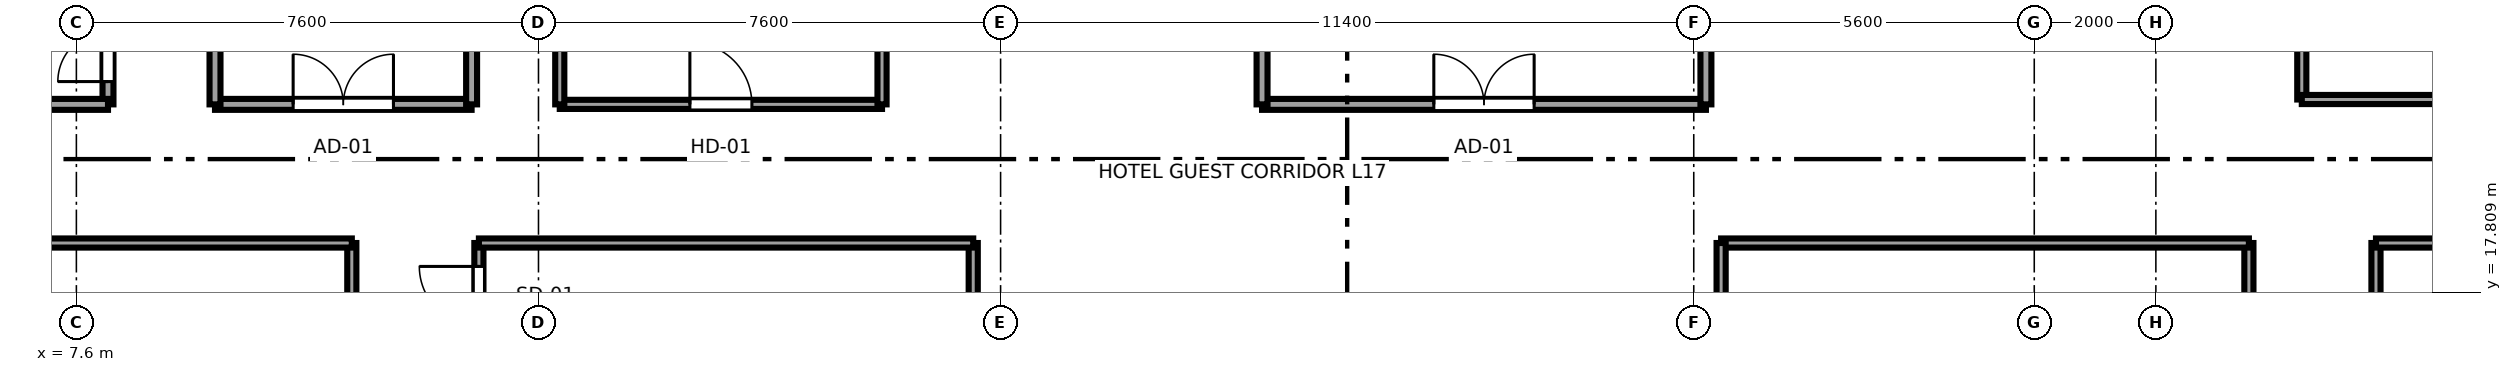
"""IFC4 building model, lengths in metres.
Left out: names, types, materials, properties, quantities, classifications, styles, units other than length and angle.
Written with IfcOpenShell. Run it as: python <this file> out.ifc"""

import sys

from ifc_helpers import new_model, si_unit, direction, frame, frame_2d, origin, place, context, subcontext, project, spatial, rectangle, extrude, source, transform, mapped, element, fill, save


model = new_model("IFC4")
c1 = context("Model", 3, precision=1e-05, world=origin(), true_north=direction((0.0, 1.0)))
c2 = subcontext(c1, "Body", "Model", "MODEL_VIEW")
j1 = project(units=[si_unit("LENGTHUNIT", "METRE"), si_unit("PLANEANGLEUNIT", "RADIAN")], contexts=[c1])
p1 = place(None, origin())
s1 = spatial("IfcSite", under=j1, at=p1, CompositionType="ELEMENT")
p2 = place(p1, origin())
s2 = spatial("IfcBuilding", under=s1, at=p2, CompositionType="ELEMENT")
p3 = place(p2, frame((0.0, 0.0, 71.05)))
s3 = spatial("IfcBuildingStorey", under=s2, at=p3, CompositionType="ELEMENT", Elevation=71.05)
p4 = place(p3, frame((12.13, 11.81, 0.0), z_axis=(0.0, 0.0, 1.0), x_axis=(0.0, 1.0, 0.0)))
e1 = element("IfcWall", 1, at=p4, inside=s3, PredefinedType="PARTITIONING", context=c2, shape_type="SweptSolid", body=[
    extrude(rectangle(XDim=6.81, YDim=0.15, at=frame_2d((3.405, 0.0))), origin(), (0.0, 0.0, 1.0), 3.37),
])
p5 = place(p4, frame((2.895, 0.0, 0.0)))
e2 = element("IfcOpeningElement", 2, at=p5, cuts=e1, PredefinedType="OPENING", context=c2, shape_type="SweptSolid", body=[
    extrude(rectangle(XDim=0.98, YDim=2.12, at=frame_2d((0.49, 1.06))), frame((0.0, 0.085, 0.0), z_axis=(0.0, -1.0, 0.0), x_axis=(1.0, 0.0, 0.0)), (0.0, 0.0, 1.0), 0.17),
])
p6 = place(p3, frame((0.405, 18.62, 0.0), z_axis=(0.0, 0.0, 1.0), x_axis=(1.0, 0.0, 0.0)))
e3 = element("IfcWall", 3, at=p6, inside=s3, PredefinedType="PARTITIONING", context=c2, shape_type="SweptSolid", body=[
    extrude(rectangle(XDim=11.725, YDim=0.15, at=frame_2d((5.862, 0.0))), origin(), (0.0, 0.0, 1.0), 3.37),
])
p7 = place(p3, frame((14.22, 15.01, 0.0), z_axis=(0.0, 0.0, 1.0), x_axis=(0.0, 1.0, 0.0)))
e4 = element("IfcWall", 4, at=p7, inside=s3, PredefinedType="PARTITIONING", context=c2, shape_type="SweptSolid", body=[
    extrude(rectangle(XDim=3.61, YDim=0.15, at=frame_2d((1.805, 0.0))), origin(), (0.0, 0.0, 1.0), 3.37),
])
p8 = place(p7, frame((2.245, 0.0, 0.0)))
e5 = element("IfcOpeningElement", 5, at=p8, cuts=e4, PredefinedType="OPENING", context=c2, shape_type="SweptSolid", body=[
    extrude(rectangle(XDim=0.98, YDim=2.12, at=frame_2d((0.49, 1.06))), frame((0.0, 0.085, 0.0), z_axis=(0.0, -1.0, 0.0), x_axis=(1.0, 0.0, 0.0)), (0.0, 0.0, 1.0), 0.17),
])
p9 = place(p3, frame((22.35, 12.68, 0.0), z_axis=(0.0, 0.0, 1.0), x_axis=(0.0, 1.0, 0.0)))
e6 = element("IfcWall", 6, at=p9, inside=s3, PredefinedType="PARTITIONING", context=c2, shape_type="SweptSolid", body=[
    extrude(rectangle(XDim=5.94, YDim=0.15, at=frame_2d((2.97, 0.0))), origin(), (0.0, 0.0, 1.0), 3.37),
])
p10 = place(p3, frame((14.22, 18.62, 0.0), z_axis=(0.0, 0.0, 1.0), x_axis=(1.0, 0.0, 0.0)))
e7 = element("IfcWall", 7, at=p10, inside=s3, PredefinedType="PARTITIONING", context=c2, shape_type="SweptSolid", body=[
    extrude(rectangle(XDim=8.13, YDim=0.15, at=frame_2d((4.065, 0.0))), origin(), (0.0, 0.0, 1.0), 3.37),
])
p11 = place(p3, frame((43.33, 11.61, 0.0), z_axis=(0.0, 0.0, 1.0), x_axis=(0.0, 1.0, 0.0)))
e8 = element("IfcWall", 8, at=p11, inside=s3, PredefinedType="PARTITIONING", context=c2, shape_type="SweptSolid", body=[
    extrude(rectangle(XDim=7.01, YDim=0.15, at=frame_2d((3.505, 0.0))), origin(), (0.0, 0.0, 1.0), 3.37),
])
p12 = place(p11, frame((2.995, 0.0, 0.0)))
e9 = element("IfcOpeningElement", 9, at=p12, cuts=e8, PredefinedType="OPENING", context=c2, shape_type="SweptSolid", body=[
    extrude(rectangle(XDim=0.98, YDim=2.12, at=frame_2d((0.49, 1.06))), frame((0.0, 0.085, 0.0), z_axis=(0.0, -1.0, 0.0), x_axis=(1.0, 0.0, 0.0)), (0.0, 0.0, 1.0), 0.17),
])
p13 = place(p3, frame((34.65, 18.62, 0.0), z_axis=(0.0, 0.0, 1.0), x_axis=(1.0, 0.0, 0.0)))
e10 = element("IfcWall", 10, at=p13, inside=s3, PredefinedType="PARTITIONING", context=c2, shape_type="SweptSolid", body=[
    extrude(rectangle(XDim=8.68, YDim=0.15, at=frame_2d((4.34, 0.0))), origin(), (0.0, 0.0, 1.0), 3.37),
])
p14 = place(p3, frame((34.65, 9.28, 0.0), z_axis=(0.0, 0.0, 1.0), x_axis=(0.0, 1.0, 0.0)))
e11 = element("IfcWall", 11, at=p14, inside=s3, PredefinedType="PARTITIONING", context=c2, shape_type="SweptSolid", body=[
    extrude(rectangle(XDim=9.34, YDim=0.15, at=frame_2d((4.67, 0.0))), origin(), (0.0, 0.0, 1.0), 3.37),
])
p15 = place(p3, frame((45.42, 15.81, 0.0), z_axis=(0.0, 0.0, 1.0), x_axis=(0.0, 1.0, 0.0)))
e12 = element("IfcWall", 12, at=p15, inside=s3, PredefinedType="PARTITIONING", context=c2, shape_type="SweptSolid", body=[
    extrude(rectangle(XDim=2.81, YDim=0.15, at=frame_2d((1.405, 0.0))), origin(), (0.0, 0.0, 1.0), 3.37),
])
p16 = place(p15, frame((0.895, 0.0, 0.0)))
e13 = element("IfcOpeningElement", 13, at=p16, cuts=e12, PredefinedType="OPENING", context=c2, shape_type="SweptSolid", body=[
    extrude(rectangle(XDim=0.98, YDim=2.12, at=frame_2d((0.49, 1.06))), frame((0.0, 0.085, 0.0), z_axis=(0.0, -1.0, 0.0), x_axis=(1.0, 0.0, 0.0)), (0.0, 0.0, 1.0), 0.17),
])
p17 = place(p3, frame((45.42, 18.62, 0.0), z_axis=(0.0, 0.0, 1.0), x_axis=(1.0, 0.0, 0.0)))
e14 = element("IfcWall", 14, at=p17, inside=s3, PredefinedType="PARTITIONING", context=c2, shape_type="SweptSolid", body=[
    extrude(rectangle(XDim=11.175, YDim=0.15, at=frame_2d((5.587, 0.0))), origin(), (0.0, 0.0, 1.0), 3.37),
])
p18 = place(p3, frame((8.12, 20.9, 0.0), z_axis=(0.0, 0.0, 1.0), x_axis=(0.0, 1.0, 0.0)))
e15 = element("IfcWall", 15, at=p18, inside=s3, PredefinedType="PARTITIONING", context=c2, shape_type="SweptSolid", body=[
    extrude(rectangle(XDim=5.2, YDim=0.18, at=frame_2d((2.6, 0.0))), origin(), (0.0, 0.0, 1.0), 3.37),
])
p19 = place(p18, frame((0.375, 0.0, 0.0)))
e16 = element("IfcOpeningElement", 16, at=p19, cuts=e15, PredefinedType="OPENING", context=c2, shape_type="SweptSolid", body=[
    extrude(rectangle(XDim=1.65, YDim=2.15, at=frame_2d((0.825, 1.075))), frame((0.0, 0.1, 0.0), z_axis=(0.0, -1.0, 0.0), x_axis=(1.0, 0.0, 0.0)), (0.0, 0.0, 1.0), 0.2),
])
p20 = place(p3, frame((0.405, 20.9, 0.0), z_axis=(0.0, 0.0, 1.0), x_axis=(1.0, 0.0, 0.0)))
e17 = element("IfcWall", 17, at=p20, inside=s3, PredefinedType="PARTITIONING", context=c2, shape_type="SweptSolid", body=[
    extrude(rectangle(XDim=7.715, YDim=0.18, at=frame_2d((3.857, 0.0))), origin(), (0.0, 0.0, 1.0), 3.37),
])
p21 = place(p3, frame((44.2, 20.98, 0.0), z_axis=(0.0, 0.0, 1.0), x_axis=(0.0, 1.0, 0.0)))
e18 = element("IfcWall", 18, at=p21, inside=s3, PredefinedType="PARTITIONING", context=c2, shape_type="SweptSolid", body=[
    extrude(rectangle(XDim=5.69, YDim=0.15, at=frame_2d((2.845, 0.0))), origin(), (0.0, 0.0, 1.0), 3.37),
])
p22 = place(p21, frame((2.355, 0.0, 0.0)))
e19 = element("IfcOpeningElement", 19, at=p22, cuts=e18, PredefinedType="OPENING", context=c2, shape_type="SweptSolid", body=[
    extrude(rectangle(XDim=0.98, YDim=2.12, at=frame_2d((0.49, 1.06))), frame((0.0, 0.085, 0.0), z_axis=(0.0, -1.0, 0.0), x_axis=(1.0, 0.0, 0.0)), (0.0, 0.0, 1.0), 0.17),
])
p23 = place(p3, frame((44.2, 20.98, 0.0), z_axis=(0.0, 0.0, 1.0), x_axis=(1.0, 0.0, 0.0)))
e20 = element("IfcWall", 20, at=p23, inside=s3, PredefinedType="PARTITIONING", context=c2, shape_type="SweptSolid", body=[
    extrude(rectangle(XDim=12.395, YDim=0.15, at=frame_2d((6.198, 0.0))), origin(), (0.0, 0.0, 1.0), 3.37),
])
p24 = place(p3, frame((9.88, 20.9, 0.0), z_axis=(0.0, 0.0, 1.0), x_axis=(1.0, 0.0, 0.0)))
e21 = element("IfcWall", 21, at=p24, inside=s3, PredefinedType="PARTITIONING", context=c2, shape_type="SweptSolid", body=[
    extrude(rectangle(XDim=4.22, YDim=0.18, at=frame_2d((2.11, 0.0))), origin(), (0.0, 0.0, 1.0), 3.37),
])
p25 = place(p24, frame((1.285, 0.0, 0.0)))
e22 = element("IfcOpeningElement", 22, at=p25, cuts=e21, PredefinedType="OPENING", context=c2, shape_type="SweptSolid", body=[
    extrude(rectangle(XDim=1.65, YDim=2.15, at=frame_2d((0.825, 1.075))), frame((0.0, 0.1, 0.0), z_axis=(0.0, -1.0, 0.0), x_axis=(1.0, 0.0, 0.0)), (0.0, 0.0, 1.0), 0.2),
])
for number, where, z_axis, x_axis in (
    (23, (9.88, 20.9, 0.0), (0.0, 0.0, 1.0), (0.0, 1.0, 0.0)),
    (24, (14.1, 20.9, 0.0), (0.0, 0.0, 1.0), (0.0, 1.0, 0.0)),
):
    element("IfcWall", number, at=place(p3, frame(where, z_axis=z_axis, x_axis=x_axis)), inside=s3, PredefinedType="PARTITIONING", context=c2, shape_type="SweptSolid", body=[
        extrude(rectangle(XDim=8.85, YDim=0.18, at=frame_2d((4.425, 0.0))), origin(), (0.0, 0.0, 1.0), 3.37),
    ])
p26 = place(p3, frame((27.1, 20.9, 0.0), z_axis=(0.0, 0.0, 1.0), x_axis=(1.0, 0.0, 0.0)))
e25 = element("IfcWall", 25, at=p26, inside=s3, PredefinedType="PARTITIONING", context=c2, shape_type="SweptSolid", body=[
    extrude(rectangle(XDim=7.3, YDim=0.18, at=frame_2d((3.65, 0.0))), origin(), (0.0, 0.0, 1.0), 3.37),
])
p27 = place(p26, frame((2.825, 0.0, 0.0)))
e26 = element("IfcOpeningElement", 26, at=p27, cuts=e25, PredefinedType="OPENING", context=c2, shape_type="SweptSolid", body=[
    extrude(rectangle(XDim=1.65, YDim=2.15, at=frame_2d((0.825, 1.075))), frame((0.0, 0.1, 0.0), z_axis=(0.0, -1.0, 0.0), x_axis=(1.0, 0.0, 0.0)), (0.0, 0.0, 1.0), 0.2),
])
for number, where, z_axis, x_axis in (
    (27, (27.1, 20.9, 0.0), (0.0, 0.0, 1.0), (0.0, 1.0, 0.0)),
    (28, (34.4, 20.9, 0.0), (0.0, 0.0, 1.0), (0.0, 1.0, 0.0)),
):
    element("IfcWall", number, at=place(p3, frame(where, z_axis=z_axis, x_axis=x_axis)), inside=s3, PredefinedType="PARTITIONING", context=c2, shape_type="SweptSolid", body=[
        extrude(rectangle(XDim=8.9, YDim=0.18, at=frame_2d((4.45, 0.0))), origin(), (0.0, 0.0, 1.0), 3.37),
    ])
p28 = place(p3, frame((15.55, 20.9, 0.0), z_axis=(0.0, 0.0, 1.0), x_axis=(1.0, 0.0, 0.0)))
e29 = element("IfcWall", 29, at=p28, inside=s3, PredefinedType="PARTITIONING", context=c2, shape_type="SweptSolid", body=[
    extrude(rectangle(XDim=5.3, YDim=0.15, at=frame_2d((2.65, 0.0))), origin(), (0.0, 0.0, 1.0), 3.37),
])
p29 = place(p28, frame((2.14, 0.0, 0.0)))
e30 = element("IfcOpeningElement", 30, at=p29, cuts=e29, PredefinedType="OPENING", context=c2, shape_type="SweptSolid", body=[
    extrude(rectangle(XDim=1.02, YDim=2.03, at=frame_2d((0.51, 1.015))), frame((0.0, 0.085, 0.0), z_axis=(0.0, -1.0, 0.0), x_axis=(1.0, 0.0, 0.0)), (0.0, 0.0, 1.0), 0.17),
])
for number, where, z_axis, x_axis in (
    (31, (15.55, 20.9, 0.0), (0.0, 0.0, 1.0), (0.0, 1.0, 0.0)),
    (32, (20.85, 20.9, 0.0), (0.0, 0.0, 1.0), (0.0, 1.0, 0.0)),
):
    element("IfcWall", number, at=place(p3, frame(where, z_axis=z_axis, x_axis=x_axis)), inside=s3, PredefinedType="PARTITIONING", context=c2, shape_type="SweptSolid", body=[
        extrude(rectangle(XDim=8.9, YDim=0.15, at=frame_2d((4.45, 0.0))), origin(), (0.0, 0.0, 1.0), 3.37),
    ])
m1 = source(origin(), c2, "Body", "SweptSolid", [
    extrude(rectangle(XDim=0.98, YDim=2.12, at=frame_2d((0.49, 1.06))), frame((0.0, 0.025, 0.0), z_axis=(0.0, -1.0, 0.0), x_axis=(1.0, 0.0, 0.0)), (0.0, 0.0, 1.0), 0.05),
])
p30 = place(p8, origin())
e33 = element("IfcDoor", 33, at=p30, inside=s3, OperationType="SINGLE_SWING_RIGHT", PredefinedType="DOOR", context=c2, shape_type="MappedRepresentation", body=[
    mapped(m1, transform((0.0, 0.0, 0.0), x_axis=(1.0, 0.0, 0.0), y_axis=(0.0, 1.0, 0.0), z_axis=(0.0, 0.0, 1.0), scale=1.0)),
])
fill(e5, e33)
m2 = source(origin(), c2, "Body", "SweptSolid", [
    extrude(rectangle(XDim=1.65, YDim=2.15, at=frame_2d((0.825, 1.075))), frame((0.0, 0.025, 0.0), z_axis=(0.0, -1.0, 0.0), x_axis=(1.0, 0.0, 0.0)), (0.0, 0.0, 1.0), 0.05),
])
p31 = place(p19, origin())
e34 = element("IfcDoor", 34, at=p31, inside=s3, OperationType="DOUBLE_DOOR_SINGLE_SWING", PredefinedType="DOOR", context=c2, shape_type="MappedRepresentation", body=[
    mapped(m2, transform((0.0, 0.0, 0.0), x_axis=(1.0, 0.0, 0.0), y_axis=(0.0, 1.0, 0.0), z_axis=(0.0, 0.0, 1.0), scale=1.0)),
])
fill(e16, e34)
p32 = place(p25, origin())
e35 = element("IfcDoor", 35, at=p32, inside=s3, OperationType="DOUBLE_DOOR_SINGLE_SWING", PredefinedType="DOOR", context=c2, shape_type="MappedRepresentation", body=[
    mapped(m2, transform((0.0, 0.0, 0.0), x_axis=(1.0, 0.0, 0.0), y_axis=(0.0, 1.0, 0.0), z_axis=(0.0, 0.0, 1.0), scale=1.0)),
])
fill(e22, e35)
p33 = place(p27, origin())
e36 = element("IfcDoor", 36, at=p33, inside=s3, OperationType="DOUBLE_DOOR_SINGLE_SWING", PredefinedType="DOOR", context=c2, shape_type="MappedRepresentation", body=[
    mapped(m2, transform((0.0, 0.0, 0.0), x_axis=(1.0, 0.0, 0.0), y_axis=(0.0, 1.0, 0.0), z_axis=(0.0, 0.0, 1.0), scale=1.0)),
])
fill(e26, e36)
m3 = source(origin(), c2, "Body", "SweptSolid", [
    extrude(rectangle(XDim=1.02, YDim=2.03, at=frame_2d((0.51, 1.015))), frame((0.0, 0.025, 0.0), z_axis=(0.0, -1.0, 0.0), x_axis=(1.0, 0.0, 0.0)), (0.0, 0.0, 1.0), 0.05),
])
p34 = place(p29, origin())
e37 = element("IfcDoor", 37, at=p34, inside=s3, OperationType="SINGLE_SWING_LEFT", PredefinedType="DOOR", context=c2, shape_type="MappedRepresentation", body=[
    mapped(m3, transform((0.0, 0.0, 0.0), x_axis=(1.0, 0.0, 0.0), y_axis=(0.0, 1.0, 0.0), z_axis=(0.0, 0.0, 1.0), scale=1.0)),
])
fill(e30, e37)
save(model, sys.argv[1])
